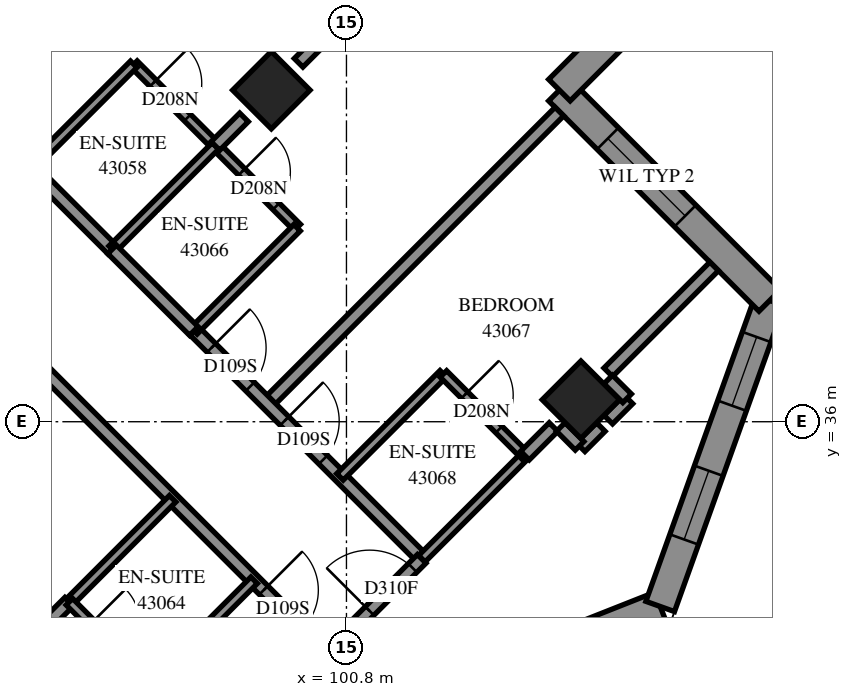
"""IFC4 building model, lengths in metres.
Left out: names, types, materials, properties, quantities, classifications, styles, units other than length and angle.
Written with IfcOpenShell. Run it as: python <this file> out.ifc"""

import sys

from ifc_helpers import new_model, si_unit, direction, frame, frame_2d, origin, origin_2d, place, context, subcontext, project, spatial, polyline, rectangle, outline, extrude, element, fill, save


model = new_model("IFC4")
c1 = context("Model", 3, precision=1e-05, world=origin(), true_north=direction((0.0, 1.0)))
c2 = subcontext(c1, "Body", "Model", "MODEL_VIEW")
j1 = project(units=[si_unit("LENGTHUNIT", "METRE"), si_unit("PLANEANGLEUNIT", "RADIAN")], contexts=[c1])
p1 = place(None, origin())
s1 = spatial("IfcSite", under=j1, at=p1, CompositionType="ELEMENT")
p2 = place(p1, origin())
s2 = spatial("IfcBuilding", under=s1, at=p2, CompositionType="ELEMENT")
p3 = place(p2, frame((0.0, 0.0, 159.2)))
s3 = spatial("IfcBuildingStorey", under=s2, at=p3, CompositionType="ELEMENT", Elevation=159.2)
for number, where, z_axis, x_axis in (
    (1, (99.565, 41.453, 0.0), (0.0, 0.0, 1.0), (0.707, -0.707, 0.0)),
    (2, (104.656, 36.362, 0.0), (0.0, 0.0, 1.0), (0.707, -0.707, 0.0)),
):
    element("IfcColumn", number, at=place(p3, frame(where, z_axis=z_axis, x_axis=x_axis)), inside=s3, PredefinedType="COLUMN", context=c2, shape_type="SweptSolid", body=[
        extrude(rectangle(XDim=0.9, YDim=0.9, at=origin_2d()), origin(), (0.0, 0.0, 1.0), 3.1),
    ])
p4 = place(p3, frame((87.049, 38.695, -0.3), z_axis=(0.0, 0.0, 1.0), x_axis=(0.7071067812, 0.7071067812, 0.0)))
e3 = element("IfcWall", 3, at=p4, inside=s3, PredefinedType="SHEAR", context=c2, shape_type="SweptSolid", body=[
    extrude(rectangle(XDim=14.4, YDim=0.6, at=frame_2d((7.2, 0.0))), origin(), (0.0, 0.0, 1.0), 2.7),
])
p5 = place(p4, frame((4.55, 0.0, 0.3)))
e4 = element("IfcOpeningElement", 4, at=p5, cuts=e3, PredefinedType="OPENING", context=c2, shape_type="SweptSolid", body=[
    extrude(rectangle(XDim=1.1, YDim=2.1, at=frame_2d((0.55, 1.05))), frame((0.0, 0.31, 0.0), z_axis=(0.0, -1.0, 0.0), x_axis=(1.0, 0.0, 0.0)), (0.0, 0.0, 1.0), 0.62),
])
p6 = place(p4, frame((11.35, 0.0, 0.3)))
e5 = element("IfcOpeningElement", 5, at=p6, cuts=e3, PredefinedType="OPENING", context=c2, shape_type="SweptSolid", body=[
    extrude(rectangle(XDim=1.1, YDim=2.1, at=frame_2d((0.55, 1.05))), frame((0.0, 0.31, 0.0), z_axis=(0.0, -1.0, 0.0), x_axis=(1.0, 0.0, 0.0)), (0.0, 0.0, 1.0), 0.62),
])
p7 = place(p3, frame((100.817, 30.929, 0.0), z_axis=(0.0, 0.0, 1.0), x_axis=(0.9299300863, 0.3677363656, 0.0)))
e6 = element("IfcWall", 6, at=p7, inside=s3, PredefinedType="SOLIDWALL", context=c2, shape_type="SweptSolid", body=[
    extrude(outline(polyline([(0.108, -0.25), (5.642, -0.25), (5.416, 0.25), (-0.108, 0.25), (0.108, -0.25)])), origin(), (0.0, 0.0, 1.0), 3.1),
])
p8 = place(p7, frame((0.626, 0.0, 0.45)))
e7 = element("IfcOpeningElement", 7, at=p8, cuts=e6, PredefinedType="OPENING", context=c2, shape_type="SweptSolid", body=[
    extrude(rectangle(XDim=2.8, YDim=2.5, at=frame_2d((1.4, 1.25))), frame((0.0, 0.26, 0.0), z_axis=(0.0, -1.0, 0.0), x_axis=(1.0, 0.0, 0.0)), (0.0, 0.0, 1.0), 0.52),
])
p9 = place(p3, frame((105.959, 32.962, 0.0), z_axis=(0.0, 0.0, 1.0), x_axis=(0.3371362761, 0.9414558574, 0.0)))
e8 = element("IfcWall", 8, at=p9, inside=s3, PredefinedType="SOLIDWALL", context=c2, shape_type="SweptSolid", body=[
    extrude(outline(polyline([(-0.113, -0.25), (5.503, -0.25), (5.187, 0.25), (0.113, 0.25), (-0.113, -0.25)])), origin(), (0.0, 0.0, 1.0), 3.1),
])
p10 = place(p9, frame((1.17, 0.0, 0.45)))
e9 = element("IfcOpeningElement", 9, at=p10, cuts=e8, PredefinedType="OPENING", context=c2, shape_type="SweptSolid", body=[
    extrude(rectangle(XDim=1.2, YDim=2.5, at=frame_2d((0.6, 1.25))), frame((0.0, 0.26, 0.0), z_axis=(0.0, -1.0, 0.0), x_axis=(1.0, 0.0, 0.0)), (0.0, 0.0, 1.0), 0.52),
])
p11 = place(p9, frame((3.507, 0.0, 0.45)))
e10 = element("IfcOpeningElement", 10, at=p11, cuts=e8, PredefinedType="OPENING", context=c2, shape_type="SweptSolid", body=[
    extrude(rectangle(XDim=1.2, YDim=2.5, at=frame_2d((0.6, 1.25))), frame((0.0, 0.26, 0.0), z_axis=(0.0, -1.0, 0.0), x_axis=(1.0, 0.0, 0.0)), (0.0, 0.0, 1.0), 0.52),
])
p12 = place(p3, frame((107.761, 37.994, 0.0), z_axis=(0.0, 0.0, 1.0), x_axis=(-0.7071170025, 0.7070965597, 0.0)))
e11 = element("IfcWall", 11, at=p12, inside=s3, PredefinedType="SOLIDWALL", context=c2, shape_type="SweptSolid", body=[
    extrude(outline(polyline([(-0.158, -0.25), (4.642, -0.25), (5.142, 0.25), (0.158, 0.25), (-0.158, -0.25)])), origin(), (0.0, 0.0, 1.0), 3.1),
])
p13 = place(p12, frame((1.967, 0.0, 0.6)))
e12 = element("IfcOpeningElement", 12, at=p13, cuts=e11, PredefinedType="OPENING", context=c2, shape_type="SweptSolid", body=[
    extrude(rectangle(XDim=1.8, YDim=1.9, at=frame_2d((0.9, 0.95))), frame((0.0, 0.26, 0.0), z_axis=(0.0, -1.0, 0.0), x_axis=(1.0, 0.0, 0.0)), (0.0, 0.0, 1.0), 0.52),
])
p14 = place(p3, frame((104.302, 41.453, 0.0), z_axis=(0.0, 0.0, 1.0), x_axis=(0.707123973, 0.707089589, 0.0)))
e13 = element("IfcWall", 13, at=p14, inside=s3, PredefinedType="SOLIDWALL", context=c2, shape_type="SweptSolid", body=[
    extrude(outline(polyline([(0.25, -0.25), (6.162, -0.25), (5.471, 0.25), (-0.25, 0.25), (0.25, -0.25)])), origin(), (0.0, 0.0, 1.0), 3.1),
])
p15 = place(p14, frame((1.125, 0.0, 0.6)))
e14 = element("IfcOpeningElement", 14, at=p15, cuts=e13, PredefinedType="OPENING", context=c2, shape_type="SweptSolid", body=[
    extrude(rectangle(XDim=1.8, YDim=1.9, at=frame_2d((0.9, 0.95))), frame((0.0, 0.26, 0.0), z_axis=(0.0, -1.0, 0.0), x_axis=(1.0, 0.0, 0.0)), (0.0, 0.0, 1.0), 0.52),
])
p16 = place(p14, frame((3.961, 0.0, 0.6)))
e15 = element("IfcOpeningElement", 15, at=p16, cuts=e13, PredefinedType="OPENING", context=c2, shape_type="SweptSolid", body=[
    extrude(rectangle(XDim=1.2, YDim=1.9, at=frame_2d((0.6, 0.95))), frame((0.0, 0.26, 0.0), z_axis=(0.0, -1.0, 0.0), x_axis=(1.0, 0.0, 0.0)), (0.0, 0.0, 1.0), 0.52),
])
p17 = place(p3, frame((94.401, 41.383, 0.0), z_axis=(0.0, 0.0, 1.0), x_axis=(0.7071067812, 0.7071067812, 0.0)))
e16 = element("IfcWall", 16, at=p17, inside=s3, PredefinedType="PARTITIONING", context=c2, shape_type="SweptSolid", body=[
    extrude(rectangle(XDim=12.04, YDim=0.2, at=frame_2d((6.02, 0.0))), origin(), (0.0, 0.0, 1.0), 3.1),
])
p18 = place(p3, frame((92.209, 40.459, 0.0), z_axis=(0.0, 0.0, 1.0), x_axis=(0.7071067812, -0.7071067812, 0.0)))
e17 = element("IfcWall", 17, at=p18, inside=s3, PredefinedType="PARTITIONING", context=c2, shape_type="SweptSolid", body=[
    extrude(rectangle(XDim=11.698, YDim=0.2, at=frame_2d((5.849, 0.0))), origin(), (0.0, 0.0, 1.0), 3.1),
])
p19 = place(p18, frame((2.931, 0.0, 0.0)))
e18 = element("IfcOpeningElement", 18, at=p19, cuts=e17, PredefinedType="OPENING", context=c2, shape_type="SweptSolid", body=[
    extrude(rectangle(XDim=1.0, YDim=2.1, at=frame_2d((0.5, 1.05))), frame((0.0, 0.11, 0.0), z_axis=(0.0, -1.0, 0.0), x_axis=(1.0, 0.0, 0.0)), (0.0, 0.0, 1.0), 0.22),
])
p20 = place(p18, frame((10.223, 0.0, 0.0)))
e19 = element("IfcOpeningElement", 19, at=p20, cuts=e17, PredefinedType="OPENING", context=c2, shape_type="SweptSolid", body=[
    extrude(rectangle(XDim=0.9, YDim=2.1, at=frame_2d((0.45, 1.05))), frame((0.0, 0.11, 0.0), z_axis=(0.0, -1.0, 0.0), x_axis=(1.0, 0.0, 0.0)), (0.0, 0.0, 1.0), 0.22),
])
p21 = place(p3, frame((93.767, 42.021, 0.0), z_axis=(0.0, 0.0, 1.0), x_axis=(0.7071067812, 0.7071067812, 0.0)))
e20 = element("IfcWall", 20, at=p21, inside=s3, PredefinedType="PARTITIONING", context=c2, shape_type="SweptSolid", body=[
    extrude(rectangle(XDim=9.998, YDim=0.2, at=frame_2d((4.999, 0.0))), origin(), (0.0, 0.0, 1.0), 3.1),
])
p22 = place(p21, frame((0.196, 0.0, 0.0)))
e21 = element("IfcOpeningElement", 21, at=p22, cuts=e20, PredefinedType="OPENING", context=c2, shape_type="SweptSolid", body=[
    extrude(rectangle(XDim=1.0, YDim=2.1, at=frame_2d((0.5, 1.05))), frame((0.0, 0.11, 0.0), z_axis=(0.0, -1.0, 0.0), x_axis=(1.0, 0.0, 0.0)), (0.0, 0.0, 1.0), 0.22),
])
p23 = place(p3, frame((91.366, 28.168, 0.0), z_axis=(0.0, 0.0, 1.0), x_axis=(0.7072591319, 0.7069543977, 0.0)))
e22 = element("IfcWall", 22, at=p23, inside=s3, PredefinedType="PARTITIONING", context=c2, shape_type="SweptSolid", body=[
    extrude(rectangle(XDim=6.891, YDim=0.2, at=frame_2d((3.446, 0.0))), origin(), (0.0, 0.0, 1.0), 3.1),
])
p24 = place(p3, frame((99.494, 36.292, 0.0), z_axis=(0.0, 0.0, 1.0), x_axis=(0.7071067812, 0.7071067812, 0.0)))
e23 = element("IfcWall", 23, at=p24, inside=s3, PredefinedType="PARTITIONING", context=c2, shape_type="SweptSolid", body=[
    extrude(rectangle(XDim=6.799, YDim=0.2, at=frame_2d((3.4, 0.0))), origin(), (0.0, 0.0, 1.0), 3.1),
])
p25 = place(p3, frame((100.013, 41.903, 0.0), z_axis=(0.0, 0.0, 1.0), x_axis=(0.7071067812, 0.7071067812, 0.0)))
e24 = element("IfcWall", 24, at=p25, inside=s3, PredefinedType="PARTITIONING", context=c2, shape_type="SweptSolid", body=[
    extrude(rectangle(XDim=5.928, YDim=0.2, at=frame_2d((2.964, 0.0))), origin(), (0.0, 0.0, 1.0), 3.1),
])
p26 = place(p3, frame((98.295, 37.497, 0.0), z_axis=(0.0, 0.0, 1.0), x_axis=(0.7071067812, -0.7071067812, 0.0)))
e25 = element("IfcWall", 25, at=p26, inside=s3, PredefinedType="PARTITIONING", context=c2, shape_type="SweptSolid", body=[
    extrude(rectangle(XDim=5.301, YDim=0.2, at=frame_2d((2.65, 0.0))), origin(), (0.0, 0.0, 1.0), 3.1),
])
p27 = place(p26, frame((0.401, 0.0, 0.0)))
e26 = element("IfcOpeningElement", 26, at=p27, cuts=e25, PredefinedType="OPENING", context=c2, shape_type="SweptSolid", body=[
    extrude(rectangle(XDim=0.9, YDim=2.1, at=frame_2d((0.45, 1.05))), frame((0.0, 0.11, 0.0), z_axis=(0.0, -1.0, 0.0), x_axis=(1.0, 0.0, 0.0)), (0.0, 0.0, 1.0), 0.22),
])
p28 = place(p26, frame((2.1, 0.0, 0.0)))
e27 = element("IfcOpeningElement", 27, at=p28, cuts=e25, PredefinedType="OPENING", context=c2, shape_type="SweptSolid", body=[
    extrude(rectangle(XDim=0.9, YDim=2.1, at=frame_2d((0.45, 1.05))), frame((0.0, 0.11, 0.0), z_axis=(0.0, -1.0, 0.0), x_axis=(1.0, 0.0, 0.0)), (0.0, 0.0, 1.0), 0.22),
])
p29 = place(p3, frame((97.305, 41.881, 0.0), z_axis=(0.0, 0.0, 1.0), x_axis=(0.7067382634, -0.707475107, 0.0)))
e28 = element("IfcWall", 28, at=p29, inside=s3, PredefinedType="PARTITIONING", context=c2, shape_type="SweptSolid", body=[
    extrude(rectangle(XDim=3.8, YDim=0.15, at=frame_2d((1.9, 0.0))), origin(), (0.0, 0.0, 1.0), 3.1),
])
p30 = place(p29, frame((0.445, 0.0, 0.0)))
e29 = element("IfcOpeningElement", 29, at=p30, cuts=e28, PredefinedType="OPENING", context=c2, shape_type="SweptSolid", body=[
    extrude(rectangle(XDim=0.8, YDim=2.1, at=frame_2d((0.4, 1.05))), frame((0.0, 0.085, 0.0), z_axis=(0.0, -1.0, 0.0), x_axis=(1.0, 0.0, 0.0)), (0.0, 0.0, 1.0), 0.17),
])
p31 = place(p29, frame((2.507, 0.0, 0.0)))
e30 = element("IfcOpeningElement", 30, at=p31, cuts=e28, PredefinedType="OPENING", context=c2, shape_type="SweptSolid", body=[
    extrude(rectangle(XDim=0.8, YDim=2.1, at=frame_2d((0.4, 1.05))), frame((0.0, 0.085, 0.0), z_axis=(0.0, -1.0, 0.0), x_axis=(1.0, 0.0, 0.0)), (0.0, 0.0, 1.0), 0.17),
])
p32 = place(p3, frame((94.399, 41.379, 0.0), z_axis=(0.0, 0.0, 1.0), x_axis=(0.7071067812, -0.7071067812, 0.0)))
e31 = element("IfcWall", 31, at=p32, inside=s3, PredefinedType="PARTITIONING", context=c2, shape_type="SweptSolid", body=[
    extrude(rectangle(XDim=3.601, YDim=0.2, at=frame_2d((1.8, 0.0))), origin(), (0.0, 0.0, 1.0), 3.1),
])
p33 = place(p32, frame((0.35, 0.0, 0.0)))
e32 = element("IfcOpeningElement", 32, at=p33, cuts=e31, PredefinedType="OPENING", context=c2, shape_type="SweptSolid", body=[
    extrude(rectangle(XDim=0.9, YDim=2.1, at=frame_2d((0.45, 1.05))), frame((0.0, 0.11, 0.0), z_axis=(0.0, -1.0, 0.0), x_axis=(1.0, 0.0, 0.0)), (0.0, 0.0, 1.0), 0.22),
])
p34 = place(p3, frame((105.105, 36.813, 0.0), z_axis=(0.0, 0.0, 1.0), x_axis=(0.7071067812, 0.7071067812, 0.0)))
e33 = element("IfcWall", 33, at=p34, inside=s3, PredefinedType="PARTITIONING", context=c2, shape_type="SweptSolid", body=[
    extrude(rectangle(XDim=2.463, YDim=0.2, at=frame_2d((1.232, 0.0))), origin(), (0.0, 0.0, 1.0), 3.1),
])
for number, where, z_axis, x_axis in (
    (34, (95.603, 40.181, 0.0), (0.0, 0.0, 1.0), (0.707, 0.707, 0.0)),
    (35, (96.947, 38.837, 0.0), (0.0, 0.0, 1.0), (0.707, 0.707, 0.0)),
    (36, (97.583, 31.695, 0.0), (0.0, 0.0, 1.0), (0.707, 0.707, 0.0)),
):
    element("IfcWall", number, at=place(p3, frame(where, z_axis=z_axis, x_axis=x_axis)), inside=s3, PredefinedType="PARTITIONING", context=c2, shape_type="SweptSolid", body=[
        extrude(rectangle(XDim=2.401, YDim=0.15, at=frame_2d((1.201, 0.0))), origin(), (0.0, 0.0, 1.0), 3.1),
    ])
for number, where, z_axis, x_axis in (
    (37, (100.693, 35.093, 0.0), (0.0, 0.0, 1.0), (0.708, 0.707, 0.0)),
    (38, (96.245, 33.035, 0.0), (0.0, 0.0, 1.0), (0.707, 0.708, 0.0)),
):
    element("IfcWall", number, at=place(p3, frame(where, z_axis=z_axis, x_axis=x_axis)), inside=s3, PredefinedType="PARTITIONING", context=c2, shape_type="SweptSolid", body=[
        extrude(rectangle(XDim=2.4, YDim=0.15, at=frame_2d((1.2, 0.0))), origin(), (0.0, 0.0, 1.0), 3.1),
    ])
p35 = place(p3, frame((98.291, 37.495, 0.0), z_axis=(0.0, 0.0, 1.0), x_axis=(0.7071067812, 0.7071067812, 0.0)))
e39 = element("IfcWall", 39, at=p35, inside=s3, PredefinedType="PARTITIONING", context=c2, shape_type="SweptSolid", body=[
    extrude(rectangle(XDim=2.398, YDim=0.15, at=frame_2d((1.199, 0.0))), origin(), (0.0, 0.0, 1.0), 3.1),
])
p36 = place(p3, frame((102.039, 33.747, 0.0), z_axis=(0.0, 0.0, 1.0), x_axis=(0.7071067812, 0.7071067812, 0.0)))
e40 = element("IfcWall", 40, at=p36, inside=s3, PredefinedType="PARTITIONING", context=c2, shape_type="SweptSolid", body=[
    extrude(rectangle(XDim=2.398, YDim=0.15, at=frame_2d((1.199, 0.0))), origin(), (0.0, 0.0, 1.0), 2.6),
])
p37 = place(p3, frame((100.483, 32.191, 0.0), z_axis=(0.0, 0.0, 1.0), x_axis=(0.7071067812, 0.7071067812, 0.0)))
e41 = element("IfcWall", 41, at=p37, inside=s3, PredefinedType="PARTITIONING", context=c2, shape_type="SweptSolid", body=[
    extrude(rectangle(XDim=2.198, YDim=0.2, at=frame_2d((1.099, 0.0))), origin(), (0.0, 0.0, 1.0), 2.6),
])
p38 = place(p37, frame((0.987, 0.0, 0.0)))
e42 = element("IfcOpeningElement", 42, at=p38, cuts=e41, PredefinedType="OPENING", context=c2, shape_type="SweptSolid", body=[
    extrude(rectangle(XDim=1.0, YDim=2.1, at=frame_2d((0.5, 1.05))), frame((0.0, 0.11, 0.0), z_axis=(0.0, -1.0, 0.0), x_axis=(1.0, 0.0, 0.0)), (0.0, 0.0, 1.0), 0.22),
])
p39 = place(p3, frame((96.946, 38.834, 0.0), z_axis=(0.0, 0.0, 1.0), x_axis=(0.7076330979, -0.7065800724, 0.0)))
e43 = element("IfcWall", 43, at=p39, inside=s3, PredefinedType="PARTITIONING", context=c2, shape_type="SweptSolid", body=[
    extrude(rectangle(XDim=1.899, YDim=0.2, at=frame_2d((0.95, 0.0))), origin(), (0.0, 0.0, 1.0), 3.1),
])
p40 = place(p3, frame((102.394, 36.786, 0.0), z_axis=(0.0, 0.0, 1.0), x_axis=(0.7065800724, -0.7076330979, 0.0)))
e44 = element("IfcWall", 44, at=p40, inside=s3, PredefinedType="PARTITIONING", context=c2, shape_type="SweptSolid", body=[
    extrude(rectangle(XDim=1.899, YDim=0.15, at=frame_2d((0.95, 0.0))), origin(), (0.0, 0.0, 1.0), 3.1),
])
p41 = place(p40, frame((0.492, 0.0, 0.0)))
e45 = element("IfcOpeningElement", 45, at=p41, cuts=e44, PredefinedType="OPENING", context=c2, shape_type="SweptSolid", body=[
    extrude(rectangle(XDim=0.8, YDim=2.1, at=frame_2d((0.4, 1.05))), frame((0.0, 0.085, 0.0), z_axis=(0.0, -1.0, 0.0), x_axis=(1.0, 0.0, 0.0)), (0.0, 0.0, 1.0), 0.17),
])
p42 = place(p3, frame((96.243, 33.039, 0.0), z_axis=(0.0, 0.0, 1.0), x_axis=(0.7065800724, -0.7076330979, 0.0)))
e46 = element("IfcWall", 46, at=p42, inside=s3, PredefinedType="PARTITIONING", context=c2, shape_type="SweptSolid", body=[
    extrude(rectangle(XDim=1.899, YDim=0.15, at=frame_2d((0.95, 0.0))), origin(), (0.0, 0.0, 1.0), 3.1),
])
p43 = place(p42, frame((0.504, 0.0, 0.0)))
e47 = element("IfcOpeningElement", 47, at=p43, cuts=e46, PredefinedType="OPENING", context=c2, shape_type="SweptSolid", body=[
    extrude(rectangle(XDim=0.8, YDim=2.1, at=frame_2d((0.4, 1.05))), frame((0.0, 0.085, 0.0), z_axis=(0.0, -1.0, 0.0), x_axis=(1.0, 0.0, 0.0)), (0.0, 0.0, 1.0), 0.17),
])
p44 = place(p3, frame((103.735, 35.443, 0.0), z_axis=(0.0, 0.0, 1.0), x_axis=(0.7071067812, 0.7071067812, 0.0)))
e48 = element("IfcWall", 48, at=p44, inside=s3, PredefinedType="PARTITIONING", context=c2, shape_type="SweptSolid", body=[
    extrude(rectangle(XDim=0.665, YDim=0.2, at=frame_2d((0.332, 0.0))), origin(), (0.0, 0.0, 1.0), 2.6),
])
p45 = place(p3, frame((98.645, 40.535, 0.0), z_axis=(0.0, 0.0, 1.0), x_axis=(0.7071067812, 0.7071067812, 0.0)))
e49 = element("IfcWall", 49, at=p45, inside=s3, PredefinedType="PARTITIONING", context=c2, shape_type="SweptSolid", body=[
    extrude(rectangle(XDim=0.665, YDim=0.2, at=frame_2d((0.332, 0.0))), origin(), (0.0, 0.0, 1.0), 3.1),
])
for number, where, z_axis, x_axis in (
    (50, (104.651, 35.581, 0.0), (0.0, 0.0, 1.0), (0.707, 0.707, 0.0)),
    (51, (105.105, 36.035, 0.0), (0.0, 0.0, 1.0), (0.707, 0.707, 0.0)),
):
    element("IfcWall", number, at=place(p3, frame(where, z_axis=z_axis, x_axis=x_axis)), inside=s3, PredefinedType="PARTITIONING", context=c2, shape_type="SweptSolid", body=[
        extrude(rectangle(XDim=0.469, YDim=0.2, at=frame_2d((0.235, 0.0))), origin(), (0.0, 0.0, 1.0), 3.1),
    ])
for number, where, z_axis, x_axis in (
    (52, (105.104, 36.694, 0.0), (0.0, 0.0, 1.0), (0.709, -0.705, 0.0)),
    (53, (104.325, 35.915, 0.0), (0.0, 0.0, 1.0), (0.705, -0.709, 0.0)),
):
    element("IfcWall", number, at=place(p3, frame(where, z_axis=z_axis, x_axis=x_axis)), inside=s3, PredefinedType="PARTITIONING", context=c2, shape_type="SweptSolid", body=[
        extrude(rectangle(XDim=0.438, YDim=0.2, at=frame_2d((0.219, 0.0))), origin(), (0.0, 0.0, 1.0), 3.1),
    ])
p46 = place(p10, origin())
e54 = element("IfcWindow", 54, at=p46, inside=s3, PartitioningType="SINGLE_PANEL", PredefinedType="WINDOW", context=c2, shape_type="SweptSolid", body=[
    extrude(rectangle(XDim=1.2, YDim=2.5, at=frame_2d((0.6, 1.25))), frame((0.0, 0.18, 0.0), z_axis=(0.0, -1.0, 0.0), x_axis=(1.0, 0.0, 0.0)), (0.0, 0.0, 1.0), 0.06),
])
fill(e9, e54)
p47 = place(p11, origin())
e55 = element("IfcWindow", 55, at=p47, inside=s3, PartitioningType="SINGLE_PANEL", PredefinedType="WINDOW", context=c2, shape_type="SweptSolid", body=[
    extrude(rectangle(XDim=1.2, YDim=2.5, at=frame_2d((0.6, 1.25))), frame((0.0, 0.18, 0.0), z_axis=(0.0, -1.0, 0.0), x_axis=(1.0, 0.0, 0.0)), (0.0, 0.0, 1.0), 0.06),
])
fill(e10, e55)
p48 = place(p13, origin())
e56 = element("IfcWindow", 56, at=p48, inside=s3, PartitioningType="SINGLE_PANEL", PredefinedType="WINDOW", context=c2, shape_type="SweptSolid", body=[
    extrude(rectangle(XDim=1.8, YDim=1.9, at=frame_2d((0.9, 0.95))), frame((0.0, 0.18, 0.0), z_axis=(0.0, -1.0, 0.0), x_axis=(1.0, 0.0, 0.0)), (0.0, 0.0, 1.0), 0.06),
])
fill(e12, e56)
p49 = place(p30, origin())
e57 = element("IfcDoor", 57, at=p49, inside=s3, OperationType="SINGLE_SWING_RIGHT", PredefinedType="DOOR", context=c2, shape_type="SweptSolid", body=[
    extrude(rectangle(XDim=0.8, YDim=2.1, at=frame_2d((0.4, 1.05))), frame((0.0, 0.025, 0.0), z_axis=(0.0, -1.0, 0.0), x_axis=(1.0, 0.0, 0.0)), (0.0, 0.0, 1.0), 0.05),
])
fill(e29, e57)
p50 = place(p20, origin())
e58 = element("IfcDoor", 58, at=p50, inside=s3, OperationType="SINGLE_SWING_LEFT", PredefinedType="DOOR", context=c2, shape_type="SweptSolid", body=[
    extrude(rectangle(XDim=0.9, YDim=2.1, at=frame_2d((0.45, 1.05))), frame((0.0, 0.025, 0.0), z_axis=(0.0, -1.0, 0.0), x_axis=(1.0, 0.0, 0.0)), (0.0, 0.0, 1.0), 0.05),
])
fill(e19, e58)
p51 = place(p27, origin())
e59 = element("IfcDoor", 59, at=p51, inside=s3, OperationType="SINGLE_SWING_LEFT", PredefinedType="DOOR", context=c2, shape_type="SweptSolid", body=[
    extrude(rectangle(XDim=0.9, YDim=2.1, at=frame_2d((0.45, 1.05))), frame((0.0, 0.025, 0.0), z_axis=(0.0, -1.0, 0.0), x_axis=(1.0, 0.0, 0.0)), (0.0, 0.0, 1.0), 0.05),
])
fill(e26, e59)
p52 = place(p31, origin())
e60 = element("IfcDoor", 60, at=p52, inside=s3, OperationType="SINGLE_SWING_RIGHT", PredefinedType="DOOR", context=c2, shape_type="SweptSolid", body=[
    extrude(rectangle(XDim=0.8, YDim=2.1, at=frame_2d((0.4, 1.05))), frame((0.0, 0.025, 0.0), z_axis=(0.0, -1.0, 0.0), x_axis=(1.0, 0.0, 0.0)), (0.0, 0.0, 1.0), 0.05),
])
fill(e30, e60)
p53 = place(p28, origin())
e61 = element("IfcDoor", 61, at=p53, inside=s3, OperationType="SINGLE_SWING_RIGHT", PredefinedType="DOOR", context=c2, shape_type="SweptSolid", body=[
    extrude(rectangle(XDim=0.9, YDim=2.1, at=frame_2d((0.45, 1.05))), frame((0.0, 0.025, 0.0), z_axis=(0.0, -1.0, 0.0), x_axis=(1.0, 0.0, 0.0)), (0.0, 0.0, 1.0), 0.05),
])
fill(e27, e61)
p54 = place(p41, origin())
e62 = element("IfcDoor", 62, at=p54, inside=s3, OperationType="SINGLE_SWING_RIGHT", PredefinedType="DOOR", context=c2, shape_type="SweptSolid", body=[
    extrude(rectangle(XDim=0.8, YDim=2.1, at=frame_2d((0.4, 1.05))), frame((0.0, 0.025, 0.0), z_axis=(0.0, -1.0, 0.0), x_axis=(1.0, 0.0, 0.0)), (0.0, 0.0, 1.0), 0.05),
])
fill(e45, e62)
p55 = place(p38, origin())
e63 = element("IfcDoor", 63, at=p55, inside=s3, OperationType="SINGLE_SWING_RIGHT", PredefinedType="DOOR", context=c2, shape_type="SweptSolid", body=[
    extrude(rectangle(XDim=1.0, YDim=2.1, at=frame_2d((0.5, 1.05))), frame((0.0, 0.025, 0.0), z_axis=(0.0, -1.0, 0.0), x_axis=(1.0, 0.0, 0.0)), (0.0, 0.0, 1.0), 0.05),
])
fill(e42, e63)
save(model, sys.argv[1])
